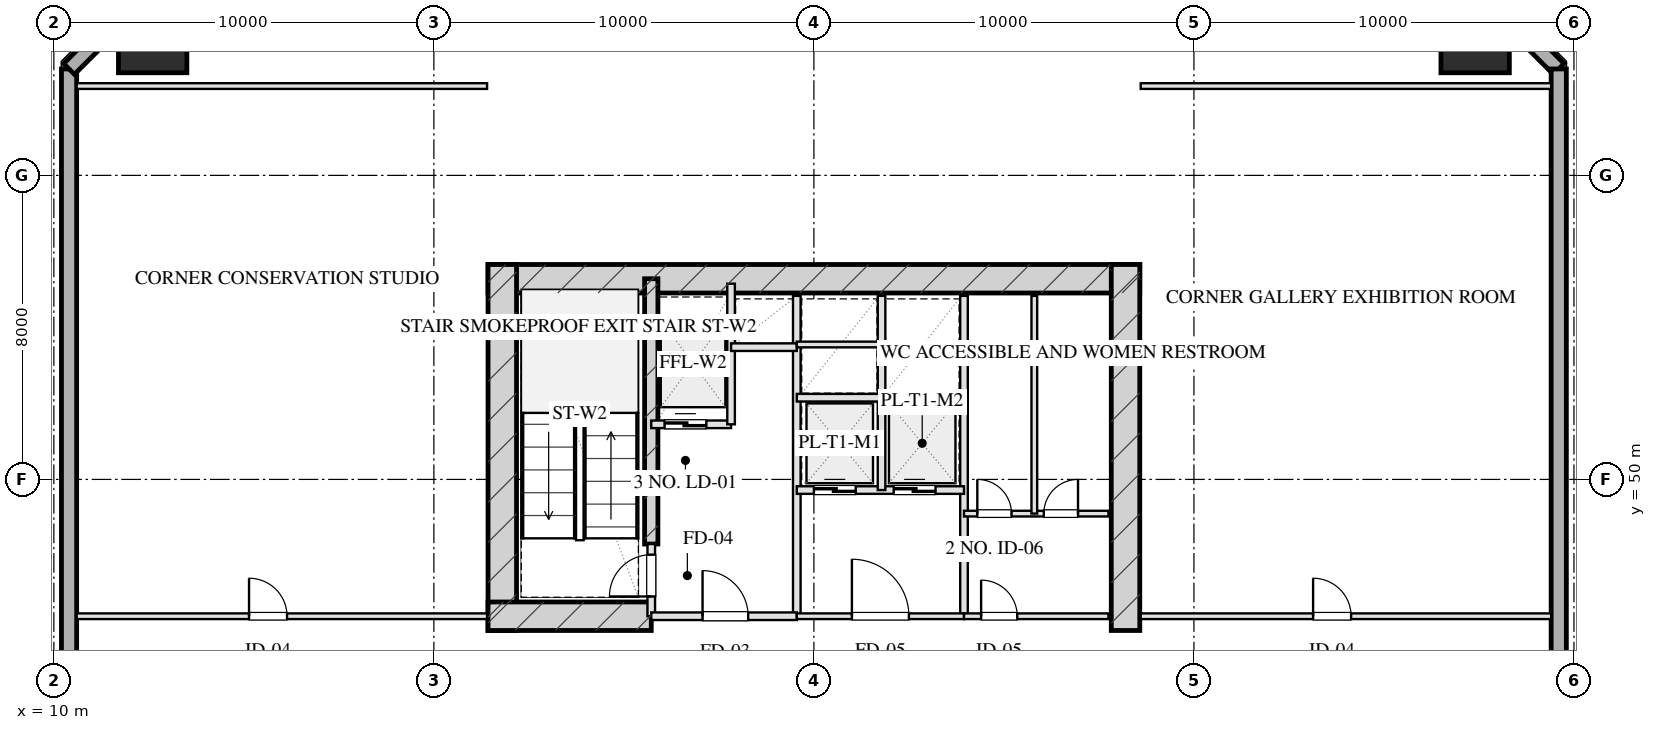
"""IFC4 building model, lengths in metres.
Left out: names, types, materials, properties, quantities, classifications, styles, units other than length and angle.
Written with IfcOpenShell. Run it as: python <this file> out.ifc"""

import sys

from ifc_helpers import new_model, si_unit, direction, frame, frame_2d, origin, origin_2d, place, context, subcontext, project, spatial, rectangle, hollow_rectangle, extrude, element, fill, save


model = new_model("IFC4")
c1 = context("Model", 3, precision=1e-05, world=origin(), true_north=direction((0.0, 1.0)))
c2 = subcontext(c1, "Body", "Model", "MODEL_VIEW")
j1 = project(units=[si_unit("LENGTHUNIT", "METRE"), si_unit("PLANEANGLEUNIT", "RADIAN")], contexts=[c1])
p1 = place(None, origin())
s1 = spatial("IfcSite", under=j1, at=p1, CompositionType="ELEMENT")
p2 = place(p1, origin())
s2 = spatial("IfcBuilding", under=s1, at=p2, CompositionType="ELEMENT")
p3 = place(p2, frame((0.0, 0.0, 34.0)))
s3 = spatial("IfcBuildingStorey", under=s2, at=p3, CompositionType="ELEMENT", Elevation=34.0)
p4 = place(p3, frame((21.425, 55.28, 0.0), z_axis=(0.0, 0.0, 1.0), x_axis=(1.0, 0.0, 0.0)))
e1 = element("IfcWall", 1, at=p4, inside=s3, PredefinedType="SHEAR", context=c2, shape_type="SweptSolid", body=[
    extrude(rectangle(XDim=17.15, YDim=0.75, at=frame_2d((8.575, 0.0))), origin(), (0.0, 0.0, 1.0), 4.0),
])
for number, where, z_axis, x_axis in (
    (2, (21.8, 46.025, 0.0), (0.0, 0.0, 1.0), (0.0, 1.0, 0.0)),
    (3, (38.2, 46.025, 0.0), (0.0, 0.0, 1.0), (0.0, 1.0, 0.0)),
):
    element("IfcWall", number, at=place(p3, frame(where, z_axis=z_axis, x_axis=x_axis)), inside=s3, PredefinedType="SHEAR", context=c2, shape_type="SweptSolid", body=[
        extrude(rectangle(XDim=9.63, YDim=0.75, at=frame_2d((4.815, 0.0))), origin(), (0.0, 0.0, 1.0), 4.0),
    ])
p5 = place(p3, frame((25.72, 48.3, 0.0), z_axis=(0.0, 0.0, 1.0), x_axis=(0.0, 1.0, 0.0)))
e4 = element("IfcWall", 4, at=p5, inside=s3, PredefinedType="SHEAR", context=c2, shape_type="SweptSolid", body=[
    extrude(rectangle(XDim=6.98, YDim=0.35, at=frame_2d((3.49, 0.0))), origin(), (0.0, 0.0, 1.0), 4.0),
])
p6 = place(p3, frame((21.425, 46.4, 0.0), z_axis=(0.0, 0.0, 1.0), x_axis=(1.0, 0.0, 0.0)))
e5 = element("IfcWall", 5, at=p6, inside=s3, PredefinedType="SHEAR", context=c2, shape_type="SweptSolid", body=[
    extrude(rectangle(XDim=4.295, YDim=0.75, at=frame_2d((2.147, 0.0))), origin(), (0.0, 0.0, 1.0), 4.0),
])
for number, where, z_axis, x_axis in (
    (6, (47.4, 61.6, 0.0), (0.0, 0.0, 1.0), (1.0, 0.0, 0.0)),
    (7, (12.6, 61.6, 0.0), (0.0, 0.0, 1.0), (1.0, 0.0, 0.0)),
):
    element("IfcColumn", number, at=place(p3, frame(where, z_axis=z_axis, x_axis=x_axis)), inside=s3, PredefinedType="COLUMN", context=c2, shape_type="SweptSolid", body=[
        extrude(hollow_rectangle(XDim=1.8, YDim=1.8, WallThickness=0.06, at=origin_2d()), origin(), (0.0, 0.0, 1.0), 4.001),
    ])
p7 = place(p3, frame((10.4, 7.2, 0.0), z_axis=(0.0, 0.0, 1.0), x_axis=(0.0, 1.0, 0.0)))
e8 = element("IfcWall", 8, at=p7, inside=s3, PredefinedType="SOLIDWALL", context=c2, shape_type="SweptSolid", body=[
    extrude(rectangle(XDim=53.6, YDim=0.4, at=frame_2d((26.8, 0.0))), origin(), (0.0, 0.0, 1.0), 3.16),
])
p8 = place(p7, frame((22.95, 0.0, 0.75)))
e9 = element("IfcOpeningElement", 9, at=p8, cuts=e8, PredefinedType="OPENING", context=c2, shape_type="SweptSolid", body=[
    extrude(rectangle(XDim=2.5, YDim=1.75, at=frame_2d((1.25, 0.875))), frame((0.0, 0.21, 0.0), z_axis=(0.0, -1.0, 0.0), x_axis=(1.0, 0.0, 0.0)), (0.0, 0.0, 1.0), 0.42),
])
p9 = place(p7, frame((29.35, 0.0, 0.0)))
e10 = element("IfcOpeningElement", 10, at=p9, cuts=e8, PredefinedType="OPENING", context=c2, shape_type="SweptSolid", body=[
    extrude(rectangle(XDim=1.1, YDim=2.15, at=frame_2d((0.55, 1.075))), frame((0.0, 0.21, 0.0), z_axis=(0.0, -1.0, 0.0), x_axis=(1.0, 0.0, 0.0)), (0.0, 0.0, 1.0), 0.42),
])
for number, where, z_axis, x_axis in (
    (11, (10.4, 60.8, 0.0), (0.0, 0.0, 1.0), (0.707, 0.707, 0.0)),
    (12, (46.6, 63.8, 0.0), (0.0, 0.0, 1.0), (0.707, -0.707, 0.0)),
):
    element("IfcWall", number, at=place(p3, frame(where, z_axis=z_axis, x_axis=x_axis)), inside=s3, PredefinedType="SOLIDWALL", context=c2, shape_type="SweptSolid", body=[
        extrude(rectangle(XDim=4.243, YDim=0.4, at=frame_2d((2.121, 0.0))), origin(), (0.0, 0.0, 1.0), 3.16),
    ])
p10 = place(p3, frame((49.6, 60.8, 0.0), z_axis=(0.0, 0.0, 1.0), x_axis=(0.0, -1.0, 0.0)))
e13 = element("IfcWall", 13, at=p10, inside=s3, PredefinedType="SOLIDWALL", context=c2, shape_type="SweptSolid", body=[
    extrude(rectangle(XDim=53.6, YDim=0.4, at=frame_2d((26.8, 0.0))), origin(), (0.0, 0.0, 1.0), 3.16),
])
p11 = place(p10, frame((28.15, 0.0, 0.75)))
e14 = element("IfcOpeningElement", 14, at=p11, cuts=e13, PredefinedType="OPENING", context=c2, shape_type="SweptSolid", body=[
    extrude(rectangle(XDim=2.5, YDim=1.75, at=frame_2d((1.25, 0.875))), frame((0.0, 0.21, 0.0), z_axis=(0.0, -1.0, 0.0), x_axis=(1.0, 0.0, 0.0)), (0.0, 0.0, 1.0), 0.42),
])
p12 = place(p10, frame((23.15, 0.0, 0.0)))
e15 = element("IfcOpeningElement", 15, at=p12, cuts=e13, PredefinedType="OPENING", context=c2, shape_type="SweptSolid", body=[
    extrude(rectangle(XDim=1.1, YDim=2.15, at=frame_2d((0.55, 1.075))), frame((0.0, 0.21, 0.0), z_axis=(0.0, -1.0, 0.0), x_axis=(1.0, 0.0, 0.0)), (0.0, 0.0, 1.0), 0.42),
])
p13 = place(p3, frame((25.72, 46.4, 0.0), z_axis=(0.0, 0.0, 1.0), x_axis=(0.0, 1.0, 0.0)))
e16 = element("IfcWall", 16, at=p13, inside=s3, PredefinedType="PARTITIONING", context=c2, shape_type="SweptSolid", body=[
    extrude(rectangle(XDim=1.9, YDim=0.2, at=frame_2d((0.95, 0.0))), origin(), (0.0, 0.0, 1.0), 3.725),
])
p14 = place(p13, frame((0.52, 0.0, 0.0)))
e17 = element("IfcOpeningElement", 17, at=p14, cuts=e16, PredefinedType="OPENING", context=c2, shape_type="SweptSolid", body=[
    extrude(rectangle(XDim=1.1, YDim=2.05, at=frame_2d((0.55, 1.025))), frame((0.0, 0.11, 0.0), z_axis=(0.0, -1.0, 0.0), x_axis=(1.0, 0.0, 0.0)), (0.0, 0.0, 1.0), 0.22),
])
p15 = place(p3, frame((29.55, 46.4, 0.0), z_axis=(0.0, 0.0, 1.0), x_axis=(0.0, 1.0, 0.0)))
e18 = element("IfcWall", 18, at=p15, inside=s3, PredefinedType="PARTITIONING", context=c2, shape_type="SweptSolid", body=[
    extrude(rectangle(XDim=8.43, YDim=0.2, at=frame_2d((4.215, 0.0))), origin(), (0.0, 0.0, 1.0), 3.725),
])
p16 = place(p3, frame((25.72, 46.4, 0.0), z_axis=(0.0, 0.0, 1.0), x_axis=(1.0, 0.0, 0.0)))
e19 = element("IfcWall", 19, at=p16, inside=s3, PredefinedType="PARTITIONING", context=c2, shape_type="SweptSolid", body=[
    extrude(rectangle(XDim=3.83, YDim=0.2, at=frame_2d((1.915, 0.0))), origin(), (0.0, 0.0, 1.0), 3.725),
])
p17 = place(p16, frame((1.35, 0.0, 0.0)))
e20 = element("IfcOpeningElement", 20, at=p17, cuts=e19, PredefinedType="OPENING", context=c2, shape_type="SweptSolid", body=[
    extrude(rectangle(XDim=1.2, YDim=2.05, at=frame_2d((0.6, 1.025))), frame((0.0, 0.11, 0.0), z_axis=(0.0, -1.0, 0.0), x_axis=(1.0, 0.0, 0.0)), (0.0, 0.0, 1.0), 0.22),
])
p18 = place(p3, frame((25.72, 51.45, 0.0), z_axis=(0.0, 0.0, 1.0), x_axis=(1.0, 0.0, 0.0)))
e21 = element("IfcWall", 21, at=p18, inside=s3, PredefinedType="PARTITIONING", context=c2, shape_type="SweptSolid", body=[
    extrude(rectangle(XDim=2.1, YDim=0.2, at=frame_2d((1.05, 0.0))), origin(), (0.0, 0.0, 1.0), 3.725),
])
p19 = place(p18, frame((0.35, 0.0, 0.0)))
e22 = element("IfcOpeningElement", 22, at=p19, cuts=e21, PredefinedType="OPENING", context=c2, shape_type="SweptSolid", body=[
    extrude(rectangle(XDim=1.1, YDim=2.05, at=frame_2d((0.55, 1.025))), frame((0.0, 0.11, 0.0), z_axis=(0.0, -1.0, 0.0), x_axis=(1.0, 0.0, 0.0)), (0.0, 0.0, 1.0), 0.22),
])
p20 = place(p3, frame((27.82, 51.45, 0.0), z_axis=(0.0, 0.0, 1.0), x_axis=(0.0, 1.0, 0.0)))
e23 = element("IfcWall", 23, at=p20, inside=s3, PredefinedType="PARTITIONING", context=c2, shape_type="SweptSolid", body=[
    extrude(rectangle(XDim=3.7, YDim=0.2, at=frame_2d((1.85, 0.0))), origin(), (0.0, 0.0, 1.0), 3.725),
])
p21 = place(p3, frame((27.82, 53.48, 0.0), z_axis=(0.0, 0.0, 1.0), x_axis=(1.0, 0.0, 0.0)))
e24 = element("IfcWall", 24, at=p21, inside=s3, PredefinedType="PARTITIONING", context=c2, shape_type="SweptSolid", body=[
    extrude(rectangle(XDim=1.73, YDim=0.2, at=frame_2d((0.865, 0.0))), origin(), (0.0, 0.0, 1.0), 3.725),
])
p22 = place(p3, frame((33.95, 46.4, 0.0), z_axis=(0.0, 0.0, 1.0), x_axis=(0.0, 1.0, 0.0)))
e25 = element("IfcWall", 25, at=p22, inside=s3, PredefinedType="PARTITIONING", context=c2, shape_type="SweptSolid", body=[
    extrude(rectangle(XDim=8.43, YDim=0.2, at=frame_2d((4.215, 0.0))), origin(), (0.0, 0.0, 1.0), 3.725),
])
p23 = place(p3, frame((29.55, 46.4, 0.0), z_axis=(0.0, 0.0, 1.0), x_axis=(1.0, 0.0, 0.0)))
e26 = element("IfcWall", 26, at=p23, inside=s3, PredefinedType="PARTITIONING", context=c2, shape_type="SweptSolid", body=[
    extrude(rectangle(XDim=4.4, YDim=0.15, at=frame_2d((2.2, 0.0))), origin(), (0.0, 0.0, 1.0), 3.725),
])
p24 = place(p23, frame((1.45, 0.0, 0.0)))
e27 = element("IfcOpeningElement", 27, at=p24, cuts=e26, PredefinedType="OPENING", context=c2, shape_type="SweptSolid", body=[
    extrude(rectangle(XDim=1.5, YDim=2.05, at=frame_2d((0.75, 1.025))), frame((0.0, 0.085, 0.0), z_axis=(0.0, -1.0, 0.0), x_axis=(1.0, 0.0, 0.0)), (0.0, 0.0, 1.0), 0.17),
])
p25 = place(p3, frame((29.55, 49.72, 0.0), z_axis=(0.0, 0.0, 1.0), x_axis=(1.0, 0.0, 0.0)))
e28 = element("IfcWall", 28, at=p25, inside=s3, PredefinedType="PARTITIONING", context=c2, shape_type="SweptSolid", body=[
    extrude(rectangle(XDim=4.4, YDim=0.2, at=frame_2d((2.2, 0.0))), origin(), (0.0, 0.0, 1.0), 3.725),
])
p26 = place(p25, frame((0.45, 0.0, 0.0)))
e29 = element("IfcOpeningElement", 29, at=p26, cuts=e28, PredefinedType="OPENING", context=c2, shape_type="SweptSolid", body=[
    extrude(rectangle(XDim=1.1, YDim=2.05, at=frame_2d((0.55, 1.025))), frame((0.0, 0.11, 0.0), z_axis=(0.0, -1.0, 0.0), x_axis=(1.0, 0.0, 0.0)), (0.0, 0.0, 1.0), 0.22),
])
p27 = place(p25, frame((2.55, 0.0, 0.0)))
e30 = element("IfcOpeningElement", 30, at=p27, cuts=e28, PredefinedType="OPENING", context=c2, shape_type="SweptSolid", body=[
    extrude(rectangle(XDim=1.1, YDim=2.05, at=frame_2d((0.55, 1.025))), frame((0.0, 0.11, 0.0), z_axis=(0.0, -1.0, 0.0), x_axis=(1.0, 0.0, 0.0)), (0.0, 0.0, 1.0), 0.22),
])
p28 = place(p3, frame((31.78, 49.72, 0.0), z_axis=(0.0, 0.0, 1.0), x_axis=(0.0, 1.0, 0.0)))
e31 = element("IfcWall", 31, at=p28, inside=s3, PredefinedType="PARTITIONING", context=c2, shape_type="SweptSolid", body=[
    extrude(rectangle(XDim=5.11, YDim=0.2, at=frame_2d((2.555, 0.0))), origin(), (0.0, 0.0, 1.0), 3.725),
])
p29 = place(p3, frame((29.55, 52.15, 0.0), z_axis=(0.0, 0.0, 1.0), x_axis=(1.0, 0.0, 0.0)))
e32 = element("IfcWall", 32, at=p29, inside=s3, PredefinedType="PARTITIONING", context=c2, shape_type="SweptSolid", body=[
    extrude(rectangle(XDim=4.4, YDim=0.2, at=frame_2d((2.2, 0.0))), origin(), (0.0, 0.0, 1.0), 3.725),
])
p30 = place(p3, frame((29.55, 53.55, 0.0), z_axis=(0.0, 0.0, 1.0), x_axis=(1.0, 0.0, 0.0)))
e33 = element("IfcWall", 33, at=p30, inside=s3, PredefinedType="PARTITIONING", context=c2, shape_type="SweptSolid", body=[
    extrude(rectangle(XDim=2.23, YDim=0.15, at=frame_2d((1.115, 0.0))), origin(), (0.0, 0.0, 1.0), 3.725),
])
p31 = place(p3, frame((33.95, 46.4, 0.0), z_axis=(0.0, 0.0, 1.0), x_axis=(1.0, 0.0, 0.0)))
e34 = element("IfcWall", 34, at=p31, inside=s3, PredefinedType="PARTITIONING", context=c2, shape_type="SweptSolid", body=[
    extrude(rectangle(XDim=3.8, YDim=0.15, at=frame_2d((1.9, 0.0))), origin(), (0.0, 0.0, 1.0), 3.725),
])
p32 = place(p31, frame((0.45, 0.0, 0.0)))
e35 = element("IfcOpeningElement", 35, at=p32, cuts=e34, PredefinedType="OPENING", context=c2, shape_type="SweptSolid", body=[
    extrude(rectangle(XDim=0.95, YDim=2.05, at=frame_2d((0.475, 1.025))), frame((0.0, 0.085, 0.0), z_axis=(0.0, -1.0, 0.0), x_axis=(1.0, 0.0, 0.0)), (0.0, 0.0, 1.0), 0.17),
])
p33 = place(p3, frame((33.95, 49.1, 0.0), z_axis=(0.0, 0.0, 1.0), x_axis=(1.0, 0.0, 0.0)))
e36 = element("IfcWall", 36, at=p33, inside=s3, PredefinedType="PARTITIONING", context=c2, shape_type="SweptSolid", body=[
    extrude(rectangle(XDim=3.8, YDim=0.15, at=frame_2d((1.9, 0.0))), origin(), (0.0, 0.0, 1.0), 3.725),
])
p34 = place(p33, frame((0.35, 0.0, 0.0)))
e37 = element("IfcOpeningElement", 37, at=p34, cuts=e36, PredefinedType="OPENING", context=c2, shape_type="SweptSolid", body=[
    extrude(rectangle(XDim=0.9, YDim=2.05, at=frame_2d((0.45, 1.025))), frame((0.0, 0.085, 0.0), z_axis=(0.0, -1.0, 0.0), x_axis=(1.0, 0.0, 0.0)), (0.0, 0.0, 1.0), 0.17),
])
p35 = place(p33, frame((2.1, 0.0, 0.0)))
e38 = element("IfcOpeningElement", 38, at=p35, cuts=e36, PredefinedType="OPENING", context=c2, shape_type="SweptSolid", body=[
    extrude(rectangle(XDim=0.9, YDim=2.05, at=frame_2d((0.45, 1.025))), frame((0.0, 0.085, 0.0), z_axis=(0.0, -1.0, 0.0), x_axis=(1.0, 0.0, 0.0)), (0.0, 0.0, 1.0), 0.17),
])
p36 = place(p3, frame((35.8, 49.1, 0.0), z_axis=(0.0, 0.0, 1.0), x_axis=(0.0, 1.0, 0.0)))
e39 = element("IfcWall", 39, at=p36, inside=s3, PredefinedType="PARTITIONING", context=c2, shape_type="SweptSolid", body=[
    extrude(rectangle(XDim=5.73, YDim=0.15, at=frame_2d((2.865, 0.0))), origin(), (0.0, 0.0, 1.0), 3.725),
])
p37 = place(p3, frame((10.6, 60.35, 0.0), z_axis=(0.0, 0.0, 1.0), x_axis=(1.0, 0.0, 0.0)))
e40 = element("IfcWall", 40, at=p37, inside=s3, PredefinedType="PARTITIONING", context=c2, shape_type="SweptSolid", body=[
    extrude(rectangle(XDim=10.8, YDim=0.15, at=frame_2d((5.4, 0.0))), origin(), (0.0, 0.0, 1.0), 3.725),
])
p38 = place(p3, frame((10.6, 46.4, 0.0), z_axis=(0.0, 0.0, 1.0), x_axis=(1.0, 0.0, 0.0)))
e41 = element("IfcWall", 41, at=p38, inside=s3, PredefinedType="PARTITIONING", context=c2, shape_type="SweptSolid", body=[
    extrude(rectangle(XDim=10.8, YDim=0.15, at=frame_2d((5.4, 0.0))), origin(), (0.0, 0.0, 1.0), 3.725),
])
p39 = place(p38, frame((4.536, 0.0, 0.0)))
e42 = element("IfcOpeningElement", 42, at=p39, cuts=e41, PredefinedType="OPENING", context=c2, shape_type="SweptSolid", body=[
    extrude(rectangle(XDim=1.0, YDim=2.05, at=frame_2d((0.5, 1.025))), frame((0.0, 0.085, 0.0), z_axis=(0.0, -1.0, 0.0), x_axis=(1.0, 0.0, 0.0)), (0.0, 0.0, 1.0), 0.17),
])
p40 = place(p3, frame((38.6, 60.35, 0.0), z_axis=(0.0, 0.0, 1.0), x_axis=(1.0, 0.0, 0.0)))
e43 = element("IfcWall", 43, at=p40, inside=s3, PredefinedType="PARTITIONING", context=c2, shape_type="SweptSolid", body=[
    extrude(rectangle(XDim=10.8, YDim=0.15, at=frame_2d((5.4, 0.0))), origin(), (0.0, 0.0, 1.0), 3.725),
])
p41 = place(p3, frame((38.6, 46.4, 0.0), z_axis=(0.0, 0.0, 1.0), x_axis=(1.0, 0.0, 0.0)))
e44 = element("IfcWall", 44, at=p41, inside=s3, PredefinedType="PARTITIONING", context=c2, shape_type="SweptSolid", body=[
    extrude(rectangle(XDim=10.8, YDim=0.15, at=frame_2d((5.4, 0.0))), origin(), (0.0, 0.0, 1.0), 3.725),
])
p42 = place(p41, frame((4.536, 0.0, 0.0)))
e45 = element("IfcOpeningElement", 45, at=p42, cuts=e44, PredefinedType="OPENING", context=c2, shape_type="SweptSolid", body=[
    extrude(rectangle(XDim=1.0, YDim=2.05, at=frame_2d((0.5, 1.025))), frame((0.0, 0.085, 0.0), z_axis=(0.0, -1.0, 0.0), x_axis=(1.0, 0.0, 0.0)), (0.0, 0.0, 1.0), 0.17),
])
p43 = place(p14, origin())
e46 = element("IfcDoor", 46, at=p43, inside=s3, OperationType="SINGLE_SWING_LEFT", PredefinedType="DOOR", context=c2, shape_type="SweptSolid", body=[
    extrude(rectangle(XDim=1.1, YDim=2.05, at=frame_2d((0.55, 1.025))), frame((0.0, 0.025, 0.0), z_axis=(0.0, -1.0, 0.0), x_axis=(1.0, 0.0, 0.0)), (0.0, 0.0, 1.0), 0.05),
])
fill(e17, e46)
p44 = place(p17, origin())
e47 = element("IfcDoor", 47, at=p44, inside=s3, OperationType="SINGLE_SWING_LEFT", PredefinedType="DOOR", context=c2, shape_type="SweptSolid", body=[
    extrude(rectangle(XDim=1.2, YDim=2.05, at=frame_2d((0.6, 1.025))), frame((0.0, 0.025, 0.0), z_axis=(0.0, -1.0, 0.0), x_axis=(1.0, 0.0, 0.0)), (0.0, 0.0, 1.0), 0.05),
])
fill(e20, e47)
p45 = place(p19, origin())
e48 = element("IfcDoor", 48, at=p45, inside=s3, OperationType="DOUBLE_DOOR_SLIDING", PredefinedType="DOOR", context=c2, shape_type="SweptSolid", body=[
    extrude(rectangle(XDim=1.1, YDim=2.05, at=frame_2d((0.55, 1.025))), frame((0.0, 0.025, 0.0), z_axis=(0.0, -1.0, 0.0), x_axis=(1.0, 0.0, 0.0)), (0.0, 0.0, 1.0), 0.05),
])
fill(e22, e48)
p46 = place(p24, origin())
e49 = element("IfcDoor", 49, at=p46, inside=s3, OperationType="SINGLE_SWING_LEFT", PredefinedType="DOOR", context=c2, shape_type="SweptSolid", body=[
    extrude(rectangle(XDim=1.5, YDim=2.05, at=frame_2d((0.75, 1.025))), frame((0.0, 0.025, 0.0), z_axis=(0.0, -1.0, 0.0), x_axis=(1.0, 0.0, 0.0)), (0.0, 0.0, 1.0), 0.05),
])
fill(e27, e49)
p47 = place(p26, origin())
e50 = element("IfcDoor", 50, at=p47, inside=s3, OperationType="DOUBLE_DOOR_SLIDING", PredefinedType="DOOR", context=c2, shape_type="SweptSolid", body=[
    extrude(rectangle(XDim=1.1, YDim=2.05, at=frame_2d((0.55, 1.025))), frame((0.0, 0.025, 0.0), z_axis=(0.0, -1.0, 0.0), x_axis=(1.0, 0.0, 0.0)), (0.0, 0.0, 1.0), 0.05),
])
fill(e29, e50)
p48 = place(p27, origin())
e51 = element("IfcDoor", 51, at=p48, inside=s3, OperationType="DOUBLE_DOOR_SLIDING", PredefinedType="DOOR", context=c2, shape_type="SweptSolid", body=[
    extrude(rectangle(XDim=1.1, YDim=2.05, at=frame_2d((0.55, 1.025))), frame((0.0, 0.025, 0.0), z_axis=(0.0, -1.0, 0.0), x_axis=(1.0, 0.0, 0.0)), (0.0, 0.0, 1.0), 0.05),
])
fill(e30, e51)
p49 = place(p32, origin())
e52 = element("IfcDoor", 52, at=p49, inside=s3, OperationType="SINGLE_SWING_LEFT", PredefinedType="DOOR", context=c2, shape_type="SweptSolid", body=[
    extrude(rectangle(XDim=0.95, YDim=2.05, at=frame_2d((0.475, 1.025))), frame((0.0, 0.025, 0.0), z_axis=(0.0, -1.0, 0.0), x_axis=(1.0, 0.0, 0.0)), (0.0, 0.0, 1.0), 0.05),
])
fill(e35, e52)
p50 = place(p34, origin())
e53 = element("IfcDoor", 53, at=p50, inside=s3, OperationType="SINGLE_SWING_LEFT", PredefinedType="DOOR", context=c2, shape_type="SweptSolid", body=[
    extrude(rectangle(XDim=0.9, YDim=2.05, at=frame_2d((0.45, 1.025))), frame((0.0, 0.025, 0.0), z_axis=(0.0, -1.0, 0.0), x_axis=(1.0, 0.0, 0.0)), (0.0, 0.0, 1.0), 0.05),
])
fill(e37, e53)
p51 = place(p35, origin())
e54 = element("IfcDoor", 54, at=p51, inside=s3, OperationType="SINGLE_SWING_RIGHT", PredefinedType="DOOR", context=c2, shape_type="SweptSolid", body=[
    extrude(rectangle(XDim=0.9, YDim=2.05, at=frame_2d((0.45, 1.025))), frame((0.0, 0.025, 0.0), z_axis=(0.0, -1.0, 0.0), x_axis=(1.0, 0.0, 0.0)), (0.0, 0.0, 1.0), 0.05),
])
fill(e38, e54)
p52 = place(p39, origin())
e55 = element("IfcDoor", 55, at=p52, inside=s3, OperationType="SINGLE_SWING_LEFT", PredefinedType="DOOR", context=c2, shape_type="SweptSolid", body=[
    extrude(rectangle(XDim=1.0, YDim=2.05, at=frame_2d((0.5, 1.025))), frame((0.0, 0.025, 0.0), z_axis=(0.0, -1.0, 0.0), x_axis=(1.0, 0.0, 0.0)), (0.0, 0.0, 1.0), 0.05),
])
fill(e42, e55)
p53 = place(p42, origin())
e56 = element("IfcDoor", 56, at=p53, inside=s3, OperationType="SINGLE_SWING_LEFT", PredefinedType="DOOR", context=c2, shape_type="SweptSolid", body=[
    extrude(rectangle(XDim=1.0, YDim=2.05, at=frame_2d((0.5, 1.025))), frame((0.0, 0.025, 0.0), z_axis=(0.0, -1.0, 0.0), x_axis=(1.0, 0.0, 0.0)), (0.0, 0.0, 1.0), 0.05),
])
fill(e45, e56)
save(model, sys.argv[1])
